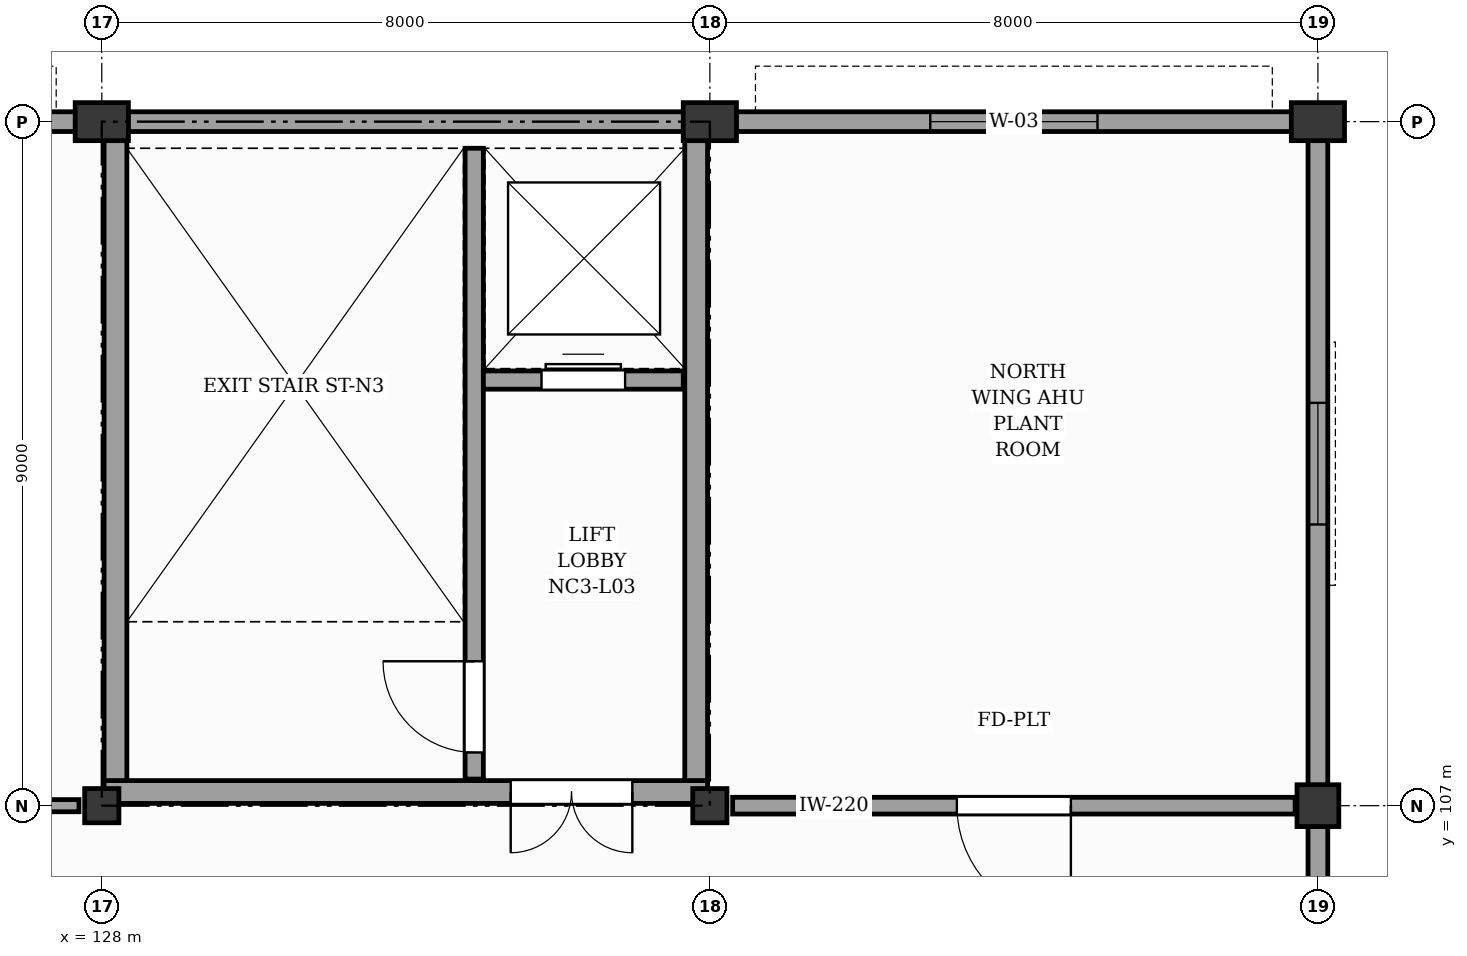
"""IFC4 building model, lengths in metres.
Left out: names, types, materials, properties, quantities, classifications, styles, units other than length and angle.
Written with IfcOpenShell. Run it as: python <this file> out.ifc"""

import sys

from ifc_helpers import new_model, si_unit, direction, frame, frame_2d, origin, origin_2d, place, context, subcontext, project, spatial, rectangle, extrude, element, fill, save


model = new_model("IFC4")
c1 = context("Model", 3, precision=1e-05, world=origin(), true_north=direction((0.0, 1.0)))
c2 = subcontext(c1, "Body", "Model", "MODEL_VIEW")
j1 = project(units=[si_unit("LENGTHUNIT", "METRE"), si_unit("PLANEANGLEUNIT", "RADIAN")], contexts=[c1])
p1 = place(None, origin())
s1 = spatial("IfcSite", under=j1, at=p1, CompositionType="ELEMENT")
p2 = place(p1, origin())
s2 = spatial("IfcBuilding", under=s1, at=p2, CompositionType="ELEMENT")
p3 = place(p2, frame((0.0, 0.0, 16.2)))
s3 = spatial("IfcBuildingStorey", under=s2, at=p3, CompositionType="ELEMENT", Elevation=16.2)
p4 = place(p3, frame((128.0, 107.0, 0.0), z_axis=(0.0, 0.0, 1.0), x_axis=(1.0, 0.0, 0.0)))
e1 = element("IfcColumn", 1, at=p4, inside=s3, PredefinedType="COLUMN", context=c2, shape_type="SweptSolid", body=[
    extrude(rectangle(XDim=0.45, YDim=0.45, at=origin_2d()), origin(), (0.0, 0.0, 1.0), 4.2),
])
p5 = place(p3, frame((128.0, 116.0, 0.0), z_axis=(0.0, 0.0, 1.0), x_axis=(1.0, 0.0, 0.0)))
e2 = element("IfcColumn", 2, at=p5, inside=s3, PredefinedType="PILASTER", context=c2, shape_type="SweptSolid", body=[
    extrude(rectangle(XDim=0.7, YDim=0.5, at=origin_2d()), origin(), (0.0, 0.0, 1.0), 4.2),
])
p6 = place(p3, frame((136.0, 107.0, 0.0), z_axis=(0.0, 0.0, 1.0), x_axis=(1.0, 0.0, 0.0)))
e3 = element("IfcColumn", 3, at=p6, inside=s3, PredefinedType="COLUMN", context=c2, shape_type="SweptSolid", body=[
    extrude(rectangle(XDim=0.45, YDim=0.45, at=origin_2d()), origin(), (0.0, 0.0, 1.0), 4.2),
])
p7 = place(p3, frame((136.0, 116.0, 0.0), z_axis=(0.0, 0.0, 1.0), x_axis=(1.0, 0.0, 0.0)))
e4 = element("IfcColumn", 4, at=p7, inside=s3, PredefinedType="PILASTER", context=c2, shape_type="SweptSolid", body=[
    extrude(rectangle(XDim=0.7, YDim=0.5, at=origin_2d()), origin(), (0.0, 0.0, 1.0), 4.2),
])
p8 = place(p3, frame((144.0, 107.0, 0.0), z_axis=(0.0, 0.0, 1.0), x_axis=(1.0, 0.0, 0.0)))
e5 = element("IfcColumn", 5, at=p8, inside=s3, PredefinedType="COLUMN", context=c2, shape_type="SweptSolid", body=[
    extrude(rectangle(XDim=0.55, YDim=0.55, at=origin_2d()), origin(), (0.0, 0.0, 1.0), 4.2),
])
p9 = place(p3, frame((144.0, 116.0, 0.0), z_axis=(0.0, 0.0, 1.0), x_axis=(1.0, 0.0, 0.0)))
e6 = element("IfcColumn", 6, at=p9, inside=s3, PredefinedType="PILASTER", context=c2, shape_type="SweptSolid", body=[
    extrude(rectangle(XDim=0.7, YDim=0.5, at=origin_2d()), origin(), (0.0, 0.0, 1.0), 4.2),
])
p10 = place(p3, frame((120.345, 116.0, 0.0), z_axis=(0.0, 0.0, 1.0), x_axis=(1.0, 0.0, 0.0)))
e7 = element("IfcWall", 7, at=p10, inside=s3, PredefinedType="SOLIDWALL", context=c2, shape_type="SweptSolid", body=[
    extrude(rectangle(XDim=7.31, YDim=0.26, at=frame_2d((3.655, 0.0))), origin(), (0.0, 0.0, 1.0), 2.83),
])
p11 = place(p10, frame((2.555, 0.0, 0.9)))
e8 = element("IfcOpeningElement", 8, at=p11, cuts=e7, PredefinedType="OPENING", context=c2, shape_type="SweptSolid", body=[
    extrude(rectangle(XDim=2.2, YDim=1.79, at=frame_2d((1.1, 0.895))), frame((0.0, 0.14, 0.0), z_axis=(0.0, -1.0, 0.0), x_axis=(1.0, 0.0, 0.0)), (0.0, 0.0, 1.0), 0.28),
])
p12 = place(p3, frame((128.345, 116.0, 0.0), z_axis=(0.0, 0.0, 1.0), x_axis=(1.0, 0.0, 0.0)))
e9 = element("IfcWall", 9, at=p12, inside=s3, PredefinedType="SOLIDWALL", context=c2, shape_type="SweptSolid", body=[
    extrude(rectangle(XDim=7.31, YDim=0.26, at=frame_2d((3.655, 0.0))), origin(), (0.0, 0.0, 1.0), 3.21),
])
p13 = place(p3, frame((136.345, 116.0, 0.0), z_axis=(0.0, 0.0, 1.0), x_axis=(1.0, 0.0, 0.0)))
e10 = element("IfcWall", 10, at=p13, inside=s3, PredefinedType="SOLIDWALL", context=c2, shape_type="SweptSolid", body=[
    extrude(rectangle(XDim=7.31, YDim=0.26, at=frame_2d((3.655, 0.0))), origin(), (0.0, 0.0, 1.0), 3.21),
])
p14 = place(p13, frame((2.555, 0.0, 0.9)))
e11 = element("IfcOpeningElement", 11, at=p14, cuts=e10, PredefinedType="OPENING", context=c2, shape_type="SweptSolid", body=[
    extrude(rectangle(XDim=2.2, YDim=1.99, at=frame_2d((1.1, 0.995))), frame((0.0, 0.14, 0.0), z_axis=(0.0, -1.0, 0.0), x_axis=(1.0, 0.0, 0.0)), (0.0, 0.0, 1.0), 0.28),
])
p15 = place(p3, frame((144.0, 98.27, 0.0), z_axis=(0.0, 0.0, 1.0), x_axis=(0.0, 1.0, 0.0)))
e12 = element("IfcWall", 12, at=p15, inside=s3, PredefinedType="SOLIDWALL", context=c2, shape_type="SweptSolid", body=[
    extrude(rectangle(XDim=8.46, YDim=0.26, at=frame_2d((4.23, 0.0))), origin(), (0.0, 0.0, 1.0), 3.24),
])
p16 = place(p15, frame((3.43, 0.0, 0.95)))
e13 = element("IfcOpeningElement", 13, at=p16, cuts=e12, PredefinedType="OPENING", context=c2, shape_type="SweptSolid", body=[
    extrude(rectangle(XDim=1.6, YDim=2.1, at=frame_2d((0.8, 1.05))), frame((0.0, 0.14, 0.0), z_axis=(0.0, -1.0, 0.0), x_axis=(1.0, 0.0, 0.0)), (0.0, 0.0, 1.0), 0.28),
])
p17 = place(p3, frame((144.0, 107.27, 0.0), z_axis=(0.0, 0.0, 1.0), x_axis=(0.0, 1.0, 0.0)))
e14 = element("IfcWall", 14, at=p17, inside=s3, PredefinedType="SOLIDWALL", context=c2, shape_type="SweptSolid", body=[
    extrude(rectangle(XDim=8.485, YDim=0.26, at=frame_2d((4.242, 0.0))), origin(), (0.0, 0.0, 1.0), 3.24),
])
p18 = place(p17, frame((3.43, 0.0, 0.95)))
e15 = element("IfcOpeningElement", 15, at=p18, cuts=e14, PredefinedType="OPENING", context=c2, shape_type="SweptSolid", body=[
    extrude(rectangle(XDim=1.6, YDim=2.1, at=frame_2d((0.8, 1.05))), frame((0.0, 0.14, 0.0), z_axis=(0.0, -1.0, 0.0), x_axis=(1.0, 0.0, 0.0)), (0.0, 0.0, 1.0), 0.28),
])
p19 = place(p3, frame((132.9, 107.35, 0.0), z_axis=(0.0, 0.0, 1.0), x_axis=(0.0, 1.0, 0.0)))
e16 = element("IfcWall", 16, at=p19, inside=s3, PredefinedType="SHEAR", context=c2, shape_type="SweptSolid", body=[
    extrude(rectangle(XDim=8.3, YDim=0.24, at=frame_2d((4.15, 0.0))), origin(), (0.0, 0.0, 1.0), 3.98),
])
p20 = place(p19, frame((0.35, 0.0, 0.0)))
e17 = element("IfcOpeningElement", 17, at=p20, cuts=e16, PredefinedType="OPENING", context=c2, shape_type="SweptSolid", body=[
    extrude(rectangle(XDim=1.2, YDim=2.15, at=frame_2d((0.6, 1.075))), frame((0.0, 0.13, 0.0), z_axis=(0.0, -1.0, 0.0), x_axis=(1.0, 0.0, 0.0)), (0.0, 0.0, 1.0), 0.26),
])
p21 = place(p3, frame((133.02, 112.6, 0.0), z_axis=(0.0, 0.0, 1.0), x_axis=(1.0, 0.0, 0.0)))
e18 = element("IfcWall", 18, at=p21, inside=s3, PredefinedType="SHEAR", context=c2, shape_type="SweptSolid", body=[
    extrude(rectangle(XDim=2.63, YDim=0.24, at=frame_2d((1.315, 0.0))), origin(), (0.0, 0.0, 1.0), 3.98),
])
p22 = place(p21, frame((0.765, 0.0, 0.0)))
e19 = element("IfcOpeningElement", 19, at=p22, cuts=e18, PredefinedType="OPENING", context=c2, shape_type="SweptSolid", body=[
    extrude(rectangle(XDim=1.1, YDim=2.15, at=frame_2d((0.55, 1.075))), frame((0.0, 0.13, 0.0), z_axis=(0.0, -1.0, 0.0), x_axis=(1.0, 0.0, 0.0)), (0.0, 0.0, 1.0), 0.26),
])
for number, where, z_axis, x_axis in (
    (20, (128.18, 107.18, 0.0), (0.0, 0.0, 1.0), (0.0, 1.0, 0.0)),
    (21, (135.82, 107.18, 0.0), (0.0, 0.0, 1.0), (0.0, 1.0, 0.0)),
):
    element("IfcWall", number, at=place(p3, frame(where, z_axis=z_axis, x_axis=x_axis)), inside=s3, PredefinedType="SHEAR", context=c2, shape_type="SweptSolid", body=[
        extrude(rectangle(XDim=8.64, YDim=0.3, at=frame_2d((4.32, 0.0))), origin(), (0.0, 0.0, 1.0), 3.98),
    ])
p23 = place(p3, frame((128.03, 107.18, 0.0), z_axis=(0.0, 0.0, 1.0), x_axis=(1.0, 0.0, 0.0)))
e22 = element("IfcWall", 22, at=p23, inside=s3, PredefinedType="SHEAR", context=c2, shape_type="SweptSolid", body=[
    extrude(rectangle(XDim=7.94, YDim=0.3, at=frame_2d((3.97, 0.0))), origin(), (0.0, 0.0, 1.0), 3.98),
])
p24 = place(p23, frame((5.35, 0.0, 0.0)))
e23 = element("IfcOpeningElement", 23, at=p24, cuts=e22, PredefinedType="OPENING", context=c2, shape_type="SweptSolid", body=[
    extrude(rectangle(XDim=1.6, YDim=2.15, at=frame_2d((0.8, 1.075))), frame((0.0, 0.16, 0.0), z_axis=(0.0, -1.0, 0.0), x_axis=(1.0, 0.0, 0.0)), (0.0, 0.0, 1.0), 0.32),
])
p25 = place(p3, frame((120.3, 107.0, 0.0), z_axis=(0.0, 0.0, 1.0), x_axis=(1.0, 0.0, 0.0)))
e24 = element("IfcWall", 24, at=p25, inside=s3, PredefinedType="PARTITIONING", context=c2, shape_type="SweptSolid", body=[
    extrude(rectangle(XDim=7.4, YDim=0.16, at=frame_2d((3.7, 0.0))), origin(), (0.0, 0.0, 1.0), 2.48),
])
p26 = place(p25, frame((3.2, 0.0, 0.0)))
e25 = element("IfcOpeningElement", 25, at=p26, cuts=e24, PredefinedType="OPENING", context=c2, shape_type="SweptSolid", body=[
    extrude(rectangle(XDim=1.0, YDim=2.1, at=frame_2d((0.5, 1.05))), frame((0.0, 0.09, 0.0), z_axis=(0.0, -1.0, 0.0), x_axis=(1.0, 0.0, 0.0)), (0.0, 0.0, 1.0), 0.18),
])
p27 = place(p3, frame((136.3, 107.0, 0.0), z_axis=(0.0, 0.0, 1.0), x_axis=(1.0, 0.0, 0.0)))
e26 = element("IfcWall", 26, at=p27, inside=s3, PredefinedType="SOLIDWALL", context=c2, shape_type="SweptSolid", body=[
    extrude(rectangle(XDim=7.4, YDim=0.22, at=frame_2d((3.7, 0.0))), origin(), (0.0, 0.0, 1.0), 3.1),
])
p28 = place(p27, frame((2.95, 0.0, 0.0)))
e27 = element("IfcOpeningElement", 27, at=p28, cuts=e26, PredefinedType="OPENING", context=c2, shape_type="SweptSolid", body=[
    extrude(rectangle(XDim=1.5, YDim=2.2, at=frame_2d((0.75, 1.1))), frame((0.0, 0.12, 0.0), z_axis=(0.0, -1.0, 0.0), x_axis=(1.0, 0.0, 0.0)), (0.0, 0.0, 1.0), 0.24),
])
p29 = place(p14, origin())
e28 = element("IfcWindow", 28, at=p29, inside=s3, PartitioningType="SINGLE_PANEL", PredefinedType="WINDOW", context=c2, shape_type="SweptSolid", body=[
    extrude(rectangle(XDim=2.2, YDim=1.99, at=frame_2d((1.1, 0.995))), frame((0.0, 0.03, 0.0), z_axis=(0.0, -1.0, 0.0), x_axis=(1.0, 0.0, 0.0)), (0.0, 0.0, 1.0), 0.06),
])
fill(e11, e28)
p30 = place(p18, origin())
e29 = element("IfcWindow", 29, at=p30, inside=s3, PartitioningType="SINGLE_PANEL", PredefinedType="WINDOW", context=c2, shape_type="SweptSolid", body=[
    extrude(rectangle(XDim=1.6, YDim=2.1, at=frame_2d((0.8, 1.05))), frame((0.0, 0.03, 0.0), z_axis=(0.0, -1.0, 0.0), x_axis=(1.0, 0.0, 0.0)), (0.0, 0.0, 1.0), 0.06),
])
fill(e15, e29)
p31 = place(p20, origin())
e30 = element("IfcDoor", 30, at=p31, inside=s3, OperationType="SINGLE_SWING_RIGHT", PredefinedType="DOOR", context=c2, shape_type="SweptSolid", body=[
    extrude(rectangle(XDim=1.2, YDim=2.15, at=frame_2d((0.6, 1.075))), frame((0.0, 0.025, 0.0), z_axis=(0.0, -1.0, 0.0), x_axis=(1.0, 0.0, 0.0)), (0.0, 0.0, 1.0), 0.05),
])
fill(e17, e30)
p32 = place(p22, origin())
e31 = element("IfcDoor", 31, at=p32, inside=s3, OperationType="DOUBLE_DOOR_SLIDING", PredefinedType="DOOR", context=c2, shape_type="SweptSolid", body=[
    extrude(rectangle(XDim=1.1, YDim=2.15, at=frame_2d((0.55, 1.075))), frame((0.0, 0.025, 0.0), z_axis=(0.0, -1.0, 0.0), x_axis=(1.0, 0.0, 0.0)), (0.0, 0.0, 1.0), 0.05),
])
fill(e19, e31)
p33 = place(p24, frame((1.6, 0.0, 0.0), z_axis=(0.0, 0.0, 1.0), x_axis=(-1.0, 0.0, 0.0)))
e32 = element("IfcDoor", 32, at=p33, inside=s3, OperationType="DOUBLE_DOOR_SINGLE_SWING", PredefinedType="DOOR", context=c2, shape_type="SweptSolid", body=[
    extrude(rectangle(XDim=1.6, YDim=2.15, at=frame_2d((0.8, 1.075))), frame((0.0, 0.025, 0.0), z_axis=(0.0, -1.0, 0.0), x_axis=(1.0, 0.0, 0.0)), (0.0, 0.0, 1.0), 0.05),
])
fill(e23, e32)
p34 = place(p28, frame((1.5, 0.0, 0.0), z_axis=(0.0, 0.0, 1.0), x_axis=(-1.0, 0.0, 0.0)))
e33 = element("IfcDoor", 33, at=p34, inside=s3, OperationType="SINGLE_SWING_RIGHT", PredefinedType="DOOR", context=c2, shape_type="SweptSolid", body=[
    extrude(rectangle(XDim=1.5, YDim=2.2, at=frame_2d((0.75, 1.1))), frame((0.0, 0.025, 0.0), z_axis=(0.0, -1.0, 0.0), x_axis=(1.0, 0.0, 0.0)), (0.0, 0.0, 1.0), 0.05),
])
fill(e27, e33)
save(model, sys.argv[1])
